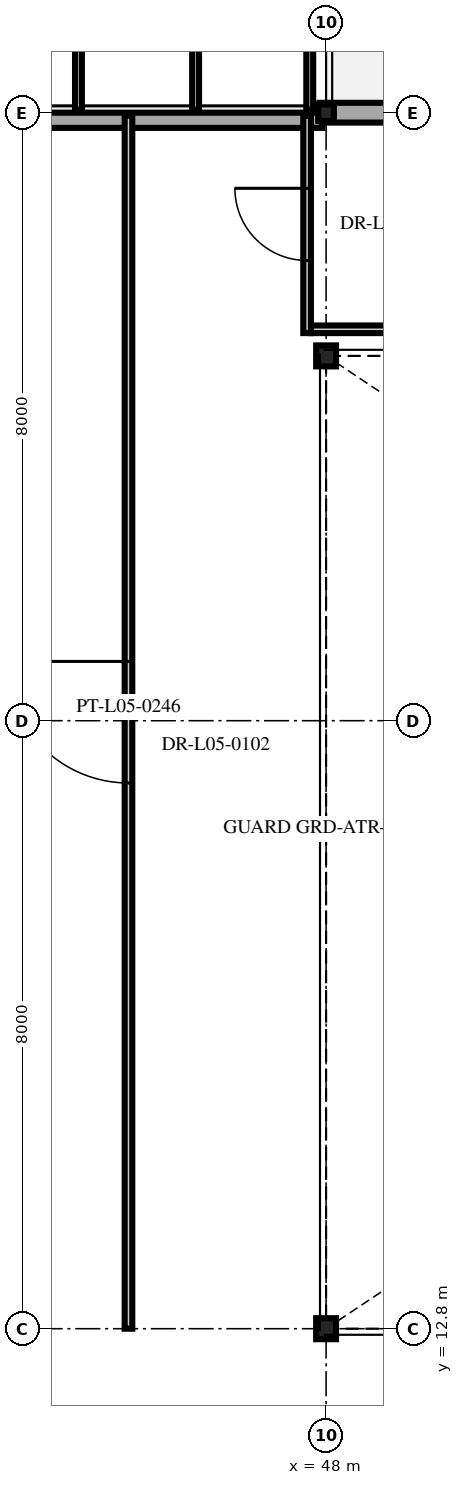
"""IFC4 building model, lengths in metres.
Left out: names, types, materials, properties, quantities, classifications, styles, units other than length and angle.
Written with IfcOpenShell. Run it as: python <this file> out.ifc"""

import sys

from ifc_helpers import new_model, si_unit, direction, frame, frame_2d, origin, origin_2d, place, context, subcontext, project, spatial, rectangle, i_section, extrude, element, fill, save


model = new_model("IFC4")
c1 = context("Model", 3, precision=1e-05, world=origin(), true_north=direction((0.0, 1.0)))
c2 = subcontext(c1, "Body", "Model", "MODEL_VIEW")
j1 = project(units=[si_unit("LENGTHUNIT", "METRE"), si_unit("PLANEANGLEUNIT", "RADIAN")], contexts=[c1])
p1 = place(None, origin())
s1 = spatial("IfcSite", under=j1, at=p1, CompositionType="ELEMENT")
p2 = place(p1, origin())
s2 = spatial("IfcBuilding", under=s1, at=p2, CompositionType="ELEMENT")
p3 = place(p2, frame((0.0, 0.0, 23.1)))
s3 = spatial("IfcBuildingStorey", under=s2, at=p3, CompositionType="ELEMENT", Elevation=23.1)
for number, where, z_axis, x_axis in (
    (1, (48.0, 12.8, 0.0), (0.0, 0.0, 1.0), (1.0, 0.0, 0.0)),
    (2, (48.0, 25.6, 0.0), (0.0, 0.0, 1.0), (1.0, 0.0, 0.0)),
):
    element("IfcColumn", number, at=place(p3, frame(where, z_axis=z_axis, x_axis=x_axis)), inside=s3, PredefinedType="COLUMN", context=c2, shape_type="SweptSolid", body=[
        extrude(i_section(OverallWidth=0.261, OverallDepth=0.276, WebThickness=0.015, FlangeThickness=0.025, at=origin_2d()), origin(), (0.0, 0.0, 1.0), 4.5),
    ])
p4 = place(p3, frame((48.0, 28.8, 0.0), z_axis=(0.0, 0.0, 1.0), x_axis=(1.0, 0.0, 0.0)))
e3 = element("IfcColumn", 3, at=p4, inside=s3, PredefinedType="COLUMN", context=c2, shape_type="SweptSolid", body=[
    extrude(i_section(OverallWidth=0.206, OverallDepth=0.216, WebThickness=0.01, FlangeThickness=0.017, at=origin_2d()), origin(), (0.0, 0.0, 1.0), 4.5),
])
p5 = place(p3, frame((47.915, 28.8, 0.0), z_axis=(0.0, 0.0, 1.0), x_axis=(1.0, 0.0, 0.0)))
e4 = element("IfcWall", 4, at=p5, inside=s3, PredefinedType="SOLIDWALL", context=c2, shape_type="SweptSolid", body=[
    extrude(rectangle(XDim=9.77, YDim=0.26, at=frame_2d((4.885, 0.0))), origin(), (0.0, 0.0, 1.0), 5.866),
])
p6 = place(p5, frame((3.985, 0.0, 0.0)))
e5 = element("IfcOpeningElement", 5, at=p6, cuts=e4, PredefinedType="OPENING", context=c2, shape_type="SweptSolid", body=[
    extrude(rectangle(XDim=1.8, YDim=2.3, at=frame_2d((0.9, 1.15))), frame((0.0, 0.14, 0.0), z_axis=(0.0, -1.0, 0.0), x_axis=(1.0, 0.0, 0.0)), (0.0, 0.0, 1.0), 0.28),
])
p7 = place(p3, frame((38.45, 28.7, 0.0), z_axis=(0.0, 0.0, 1.0), x_axis=(1.0, 0.0, 0.0)))
e6 = element("IfcWall", 6, at=p7, inside=s3, PredefinedType="PARAPET", context=c2, shape_type="SweptSolid", body=[
    extrude(rectangle(XDim=9.5, YDim=0.2, at=frame_2d((4.75, 0.0))), origin(), (0.0, 0.0, 1.0), 1.1),
])
p8 = place(p3, frame((45.4, 12.8, 0.0), z_axis=(0.0, 0.0, 1.0), x_axis=(0.0, 1.0, 0.0)))
e7 = element("IfcWall", 7, at=p8, inside=s3, PredefinedType="MOVABLE", context=c2, shape_type="SweptSolid", body=[
    extrude(rectangle(XDim=15.96, YDim=0.1, at=frame_2d((7.98, 0.0))), origin(), (0.0, 0.0, 1.0), 10.666),
])
p9 = place(p8, frame((7.18, 0.0, 0.0)))
e8 = element("IfcOpeningElement", 8, at=p9, cuts=e7, PredefinedType="OPENING", context=c2, shape_type="SweptSolid", body=[
    extrude(rectangle(XDim=1.6, YDim=2.25, at=frame_2d((0.8, 1.125))), frame((0.0, 0.06, 0.0), z_axis=(0.0, -1.0, 0.0), x_axis=(1.0, 0.0, 0.0)), (0.0, 0.0, 1.0), 0.12),
])
p10 = place(p3, frame((47.8, 25.95, 0.0), z_axis=(0.0, 0.0, 1.0), x_axis=(1.0, 0.0, 0.0)))
e9 = element("IfcWall", 9, at=p10, inside=s3, PredefinedType="MOVABLE", context=c2, shape_type="SweptSolid", body=[
    extrude(rectangle(XDim=9.75, YDim=0.1, at=frame_2d((4.875, 0.0))), origin(), (0.0, 0.0, 1.0), 8.774),
])
p11 = place(p3, frame((47.75, 25.9, 0.0), z_axis=(0.0, 0.0, 1.0), x_axis=(0.0, 1.0, 0.0)))
e10 = element("IfcWall", 10, at=p11, inside=s3, PredefinedType="MOVABLE", context=c2, shape_type="SweptSolid", body=[
    extrude(rectangle(XDim=2.86, YDim=0.1, at=frame_2d((1.43, 0.0))), origin(), (0.0, 0.0, 1.0), 10.666),
])
p12 = place(p11, frame((0.955, 0.0, 0.0)))
e11 = element("IfcOpeningElement", 11, at=p12, cuts=e10, PredefinedType="OPENING", context=c2, shape_type="SweptSolid", body=[
    extrude(rectangle(XDim=0.95, YDim=2.15, at=frame_2d((0.475, 1.075))), frame((0.0, 0.06, 0.0), z_axis=(0.0, -1.0, 0.0), x_axis=(1.0, 0.0, 0.0)), (0.0, 0.0, 1.0), 0.12),
])
p13 = place(p9, origin())
e12 = element("IfcDoor", 12, at=p13, inside=s3, OperationType="DOUBLE_DOOR_SINGLE_SWING", PredefinedType="DOOR", context=c2, shape_type="SweptSolid", body=[
    extrude(rectangle(XDim=1.6, YDim=2.25, at=frame_2d((0.8, 1.125))), frame((0.0, 0.025, 0.0), z_axis=(0.0, -1.0, 0.0), x_axis=(1.0, 0.0, 0.0)), (0.0, 0.0, 1.0), 0.05),
])
fill(e8, e12)
p14 = place(p12, origin())
e13 = element("IfcDoor", 13, at=p14, inside=s3, OperationType="SINGLE_SWING_RIGHT", PredefinedType="DOOR", context=c2, shape_type="SweptSolid", body=[
    extrude(rectangle(XDim=0.95, YDim=2.15, at=frame_2d((0.475, 1.075))), frame((0.0, 0.025, 0.0), z_axis=(0.0, -1.0, 0.0), x_axis=(1.0, 0.0, 0.0)), (0.0, 0.0, 1.0), 0.05),
])
fill(e11, e13)
save(model, sys.argv[1])
